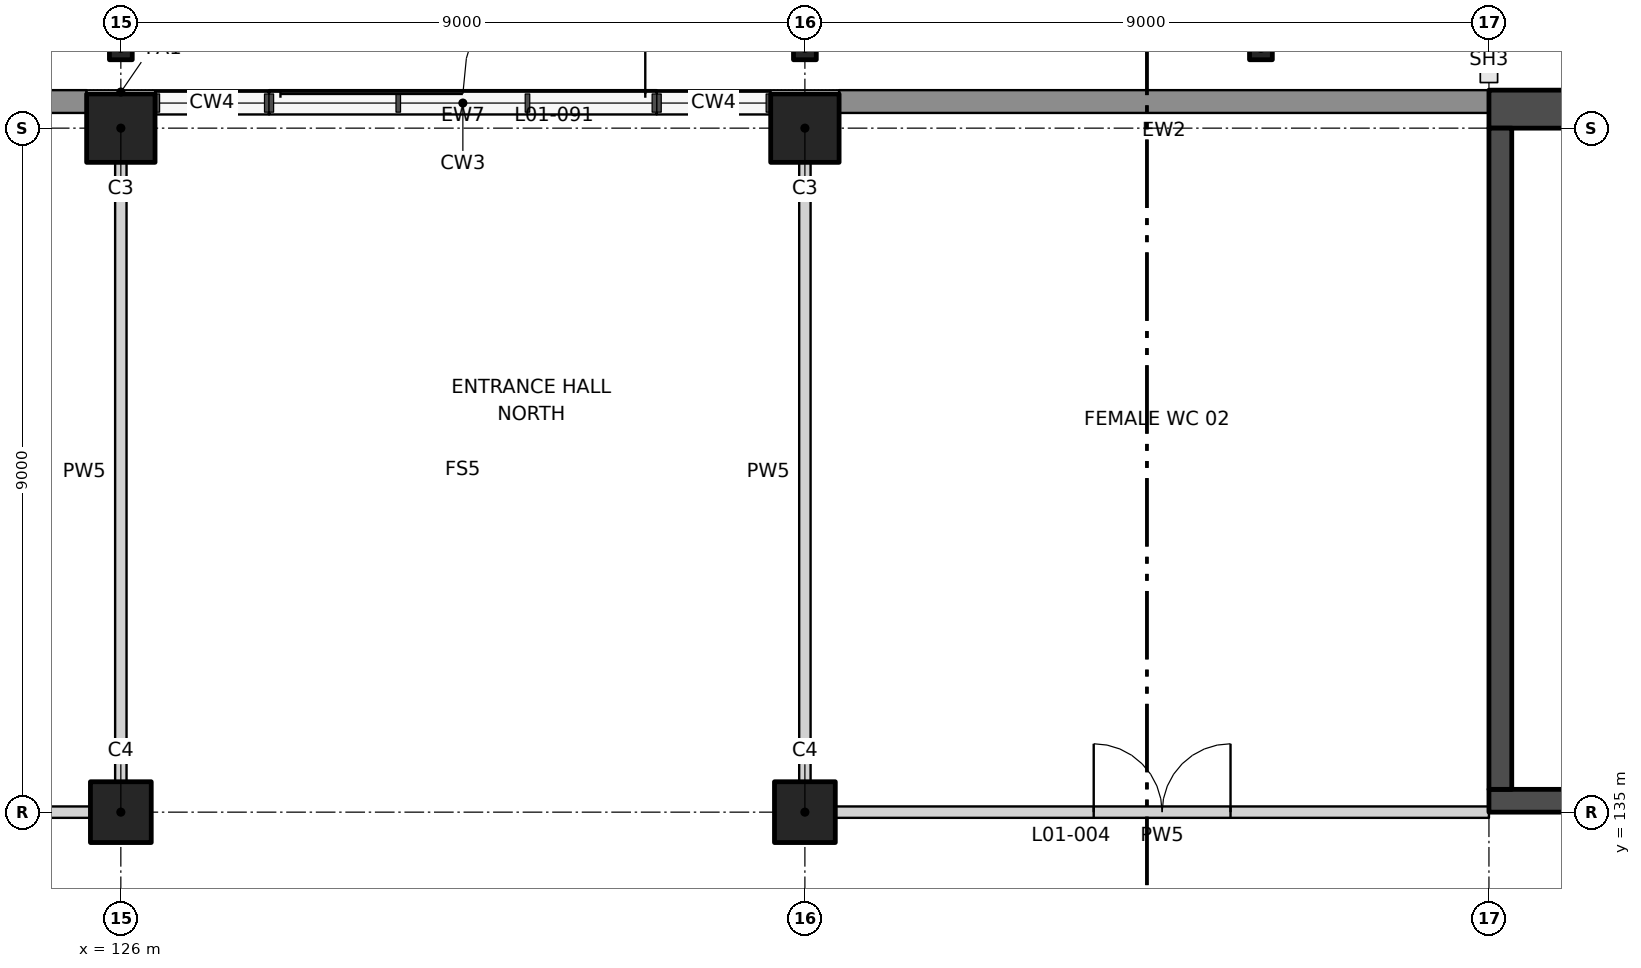
"""IFC4 building model, lengths in metres.
Left out: names, types, materials, properties, quantities, classifications, styles, units other than length and angle.
Written with IfcOpenShell. Run it as: python <this file> out.ifc"""

import sys

from ifc_helpers import new_model, si_unit, direction, frame, frame_2d, origin, origin_2d, place, context, subcontext, project, spatial, rectangle, hollow_rectangle, extrude, element, fill, save


model = new_model("IFC4")
c1 = context("Model", 3, precision=1e-05, world=origin(), true_north=direction((0.0, 1.0)))
c2 = subcontext(c1, "Body", "Model", "MODEL_VIEW")
j1 = project(units=[si_unit("LENGTHUNIT", "METRE"), si_unit("PLANEANGLEUNIT", "RADIAN")], contexts=[c1])
p1 = place(None, origin())
s1 = spatial("IfcSite", under=j1, at=p1, CompositionType="ELEMENT")
p2 = place(p1, origin())
s2 = spatial("IfcBuilding", under=s1, at=p2, CompositionType="ELEMENT")
p3 = place(p2, frame((0.0, 0.0, 7.0)))
s3 = spatial("IfcBuildingStorey", under=s2, at=p3, CompositionType="ELEMENT", Elevation=7.0)
for number, where, z_axis, x_axis in (
    (1, (126.0, 144.0, 0.0), (0.0, 0.0, 1.0), (1.0, 0.0, 0.0)),
    (2, (135.0, 144.0, 0.0), (0.0, 0.0, 1.0), (1.0, 0.0, 0.0)),
):
    element("IfcColumn", number, at=place(p3, frame(where, z_axis=z_axis, x_axis=x_axis)), inside=s3, PredefinedType="COLUMN", context=c2, shape_type="SweptSolid", body=[
        extrude(rectangle(XDim=0.9, YDim=0.9, at=origin_2d()), origin(), (0.0, 0.0, 1.0), 4.5),
    ])
for number, where, z_axis, x_axis in (
    (3, (126.0, 135.0, 0.0), (0.0, 0.0, 1.0), (1.0, 0.0, 0.0)),
    (4, (135.0, 135.0, 0.0), (0.0, 0.0, 1.0), (1.0, 0.0, 0.0)),
):
    element("IfcColumn", number, at=place(p3, frame(where, z_axis=z_axis, x_axis=x_axis)), inside=s3, PredefinedType="COLUMN", context=c2, shape_type="SweptSolid", body=[
        extrude(rectangle(XDim=0.8, YDim=0.8, at=origin_2d()), origin(), (0.0, 0.0, 1.0), 4.5),
    ])
p4 = place(p3, frame((117.3, 135.0, 0.0), z_axis=(0.0, 0.0, 1.0), x_axis=(1.0, 0.0, 0.0)))
e5 = element("IfcWall", 5, at=p4, inside=s3, PredefinedType="PARTITIONING", context=c2, shape_type="SweptSolid", body=[
    extrude(rectangle(XDim=8.3, YDim=0.15, at=frame_2d((4.15, 0.0))), origin(), (0.0, 0.0, 1.0), 3.25),
])
p5 = place(p4, frame((3.1, 0.0, 0.0)))
e6 = element("IfcOpeningElement", 6, at=p5, cuts=e5, PredefinedType="OPENING", context=c2, shape_type="SweptSolid", body=[
    extrude(rectangle(XDim=1.8, YDim=2.1, at=frame_2d((0.9, 1.05))), frame((0.0, 0.085, 0.0), z_axis=(0.0, -1.0, 0.0), x_axis=(1.0, 0.0, 0.0)), (0.0, 0.0, 1.0), 0.17),
])
p6 = place(p3, frame((135.4, 135.0, 0.0), z_axis=(0.0, 0.0, 1.0), x_axis=(1.0, 0.0, 0.0)))
e7 = element("IfcWall", 7, at=p6, inside=s3, PredefinedType="PARTITIONING", context=c2, shape_type="SweptSolid", body=[
    extrude(rectangle(XDim=8.6, YDim=0.15, at=frame_2d((4.3, 0.0))), origin(), (0.0, 0.0, 1.0), 3.25),
])
p7 = place(p6, frame((3.4, 0.0, 0.0)))
e8 = element("IfcOpeningElement", 8, at=p7, cuts=e7, PredefinedType="OPENING", context=c2, shape_type="SweptSolid", body=[
    extrude(rectangle(XDim=1.8, YDim=2.1, at=frame_2d((0.9, 1.05))), frame((0.0, 0.085, 0.0), z_axis=(0.0, -1.0, 0.0), x_axis=(1.0, 0.0, 0.0)), (0.0, 0.0, 1.0), 0.17),
])
for number, where, z_axis, x_axis in (
    (9, (126.0, 135.4, 0.0), (0.0, 0.0, 1.0), (0.0, 1.0, 0.0)),
    (10, (135.0, 135.4, 0.0), (0.0, 0.0, 1.0), (0.0, 1.0, 0.0)),
):
    element("IfcWall", number, at=place(p3, frame(where, z_axis=z_axis, x_axis=x_axis)), inside=s3, PredefinedType="PARTITIONING", context=c2, shape_type="SweptSolid", body=[
        extrude(rectangle(XDim=8.15, YDim=0.15, at=frame_2d((4.075, 0.0))), origin(), (0.0, 0.0, 1.0), 3.25),
    ])
p8 = place(p3, frame((125.55, 144.35, 0.0), z_axis=(0.0, 0.0, 1.0), x_axis=(-1.0, 0.0, 0.0)))
e11 = element("IfcWall", 11, at=p8, inside=s3, PredefinedType="SOLIDWALL", context=c2, shape_type="SweptSolid", body=[
    extrude(rectangle(XDim=8.55, YDim=0.3, at=frame_2d((4.275, 0.0))), origin(), (0.0, 0.0, 1.0), 4.5),
])
p9 = place(p3, frame((133.05, 144.45, 0.0), z_axis=(0.0, 0.0, 1.0), x_axis=(-1.0, 0.0, 0.0)))
e12 = element("IfcWall", 12, at=p9, inside=s3, PredefinedType="SOLIDWALL", context=c2, shape_type="SweptSolid", body=[
    extrude(rectangle(XDim=5.1, YDim=0.1, at=frame_2d((2.55, 0.0))), origin(), (0.0, 0.0, 1.0), 3.1),
])
p10 = place(p9, frame((0.15, 0.0, 0.0)))
e13 = element("IfcOpeningElement", 13, at=p10, cuts=e12, PredefinedType="OPENING", context=c2, shape_type="SweptSolid", body=[
    extrude(rectangle(XDim=4.8, YDim=2.7, at=frame_2d((2.4, 1.35))), frame((0.0, 0.06, 0.0), z_axis=(0.0, -1.0, 0.0), x_axis=(1.0, 0.0, 0.0)), (0.0, 0.0, 1.0), 0.12),
])
p11 = place(p3, frame((144.0, 144.35, 0.0), z_axis=(0.0, 0.0, 1.0), x_axis=(-1.0, 0.0, 0.0)))
e14 = element("IfcWall", 14, at=p11, inside=s3, PredefinedType="SOLIDWALL", context=c2, shape_type="SweptSolid", body=[
    extrude(rectangle(XDim=8.55, YDim=0.3, at=frame_2d((4.275, 0.0))), origin(), (0.0, 0.0, 1.0), 4.5),
])
for number, where, z_axis, x_axis in (
    (15, (126.0, 145.05, 0.0), (0.0, 0.0, 1.0), (1.0, 0.0, 0.0)),
    (16, (135.0, 145.05, 0.0), (0.0, 0.0, 1.0), (1.0, 0.0, 0.0)),
    (17, (141.0, 145.05, 0.0), (0.0, 0.0, 1.0), (1.0, 0.0, 0.0)),
):
    element("IfcColumn", number, at=place(p3, frame(where, z_axis=z_axis, x_axis=x_axis)), inside=s3, PredefinedType="COLUMN", context=c2, shape_type="SweptSolid", body=[
        extrude(hollow_rectangle(XDim=0.3, YDim=0.3, WallThickness=0.012, at=origin_2d()), origin(), (0.0, 0.0, 1.0), 4.5),
    ])
p12 = place(p3, frame((144.0, 135.15, 0.0), z_axis=(0.0, 0.0, 1.0), x_axis=(1.0, 0.0, 0.0)))
e18 = element("IfcWall", 18, at=p12, inside=s3, PredefinedType="SHEAR", context=c2, shape_type="SweptSolid", body=[
    extrude(rectangle(XDim=18.0, YDim=0.3, at=frame_2d((9.0, 0.0))), origin(), (0.0, 0.0, 1.0), 4.5),
])
p13 = place(p12, frame((1.5, 0.0, 0.0)))
e19 = element("IfcOpeningElement", 19, at=p13, cuts=e18, PredefinedType="OPENING", context=c2, shape_type="SweptSolid", body=[
    extrude(rectangle(XDim=1.2, YDim=2.1, at=frame_2d((0.6, 1.05))), frame((0.0, 0.16, 0.0), z_axis=(0.0, -1.0, 0.0), x_axis=(1.0, 0.0, 0.0)), (0.0, 0.0, 1.0), 0.32),
])
p14 = place(p3, frame((144.0, 144.25, 0.0), z_axis=(0.0, 0.0, 1.0), x_axis=(1.0, 0.0, 0.0)))
e20 = element("IfcWall", 20, at=p14, inside=s3, PredefinedType="SHEAR", context=c2, shape_type="SweptSolid", body=[
    extrude(rectangle(XDim=18.0, YDim=0.5, at=frame_2d((9.0, 0.0))), origin(), (0.0, 0.0, 1.0), 4.5),
])
p15 = place(p3, frame((144.15, 135.3, 0.0), z_axis=(0.0, 0.0, 1.0), x_axis=(0.0, 1.0, 0.0)))
e21 = element("IfcWall", 21, at=p15, inside=s3, PredefinedType="SHEAR", context=c2, shape_type="SweptSolid", body=[
    extrude(rectangle(XDim=8.7, YDim=0.3, at=frame_2d((4.35, 0.0))), origin(), (0.0, 0.0, 1.0), 4.5),
])
p16 = place(p7, origin())
e22 = element("IfcDoor", 22, at=p16, inside=s3, OperationType="DOUBLE_DOOR_DOUBLE_SWING", PredefinedType="DOOR", context=c2, shape_type="SweptSolid", body=[
    extrude(rectangle(XDim=1.8, YDim=2.1, at=frame_2d((0.9, 1.05))), frame((0.0, 0.025, 0.0), z_axis=(0.0, -1.0, 0.0), x_axis=(1.0, 0.0, 0.0)), (0.0, 0.0, 1.0), 0.05),
])
fill(e8, e22)
p17 = place(p10, frame((4.8, 0.0, 0.0), z_axis=(0.0, 0.0, 1.0), x_axis=(-1.0, 0.0, 0.0)))
e23 = element("IfcDoor", 23, at=p17, inside=s3, OperationType="DOUBLE_DOOR_SINGLE_SWING", PredefinedType="DOOR", context=c2, shape_type="SweptSolid", body=[
    extrude(rectangle(XDim=4.8, YDim=2.7, at=frame_2d((2.4, 1.35))), frame((0.0, 0.025, 0.0), z_axis=(0.0, -1.0, 0.0), x_axis=(1.0, 0.0, 0.0)), (0.0, 0.0, 1.0), 0.05),
])
fill(e13, e23)
save(model, sys.argv[1])
